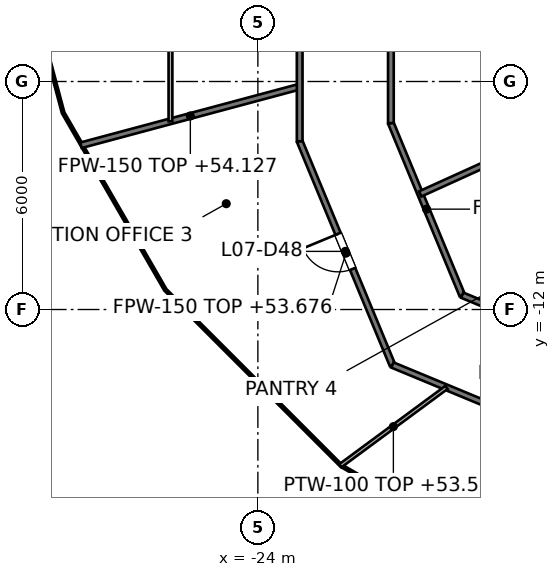
"""IFC4 building model, lengths in metres.
Left out: names, types, materials, properties, quantities, classifications, styles, units other than length and angle.
Written with IfcOpenShell. Run it as: python <this file> out.ifc"""

import sys

from ifc_helpers import new_model, si_unit, direction, frame, frame_2d, origin, place, context, subcontext, project, spatial, rectangle, extrude, element, fill, save


model = new_model("IFC4")
c1 = context("Model", 3, precision=1e-05, world=origin(), true_north=direction((0.0, 1.0)))
c2 = subcontext(c1, "Body", "Model", "MODEL_VIEW")
j1 = project(units=[si_unit("LENGTHUNIT", "METRE"), si_unit("PLANEANGLEUNIT", "RADIAN")], contexts=[c1])
p1 = place(None, origin())
s1 = spatial("IfcSite", under=j1, at=p1, CompositionType="ELEMENT")
p2 = place(p1, origin())
s2 = spatial("IfcBuilding", under=s1, at=p2, CompositionType="ELEMENT")
p3 = place(p2, frame((0.0, 0.0, 50.4)))
s3 = spatial("IfcBuildingStorey", under=s2, at=p3, CompositionType="ELEMENT", Elevation=50.4)
p4 = place(p3, frame((-22.9, -7.572, 0.0), z_axis=(0.0, 0.0, 1.0), x_axis=(0.382860357704, -0.923806227788, 0.0)))
e1 = element("IfcWall", 1, at=p4, inside=s3, PredefinedType="PARTITIONING", context=c2, shape_type="SweptSolid", body=[
    extrude(rectangle(XDim=6.374, YDim=0.15, at=frame_2d((3.187, 0.0))), origin(), (0.0, 0.0, 1.0), 3.276),
])
p5 = place(p4, frame((2.637, 0.0, 0.0)))
e2 = element("IfcOpeningElement", 2, at=p5, cuts=e1, PredefinedType="OPENING", context=c2, shape_type="SweptSolid", body=[
    extrude(rectangle(XDim=1.0, YDim=2.1, at=frame_2d((0.5, 1.05))), frame((0.0, 0.075, 0.0), z_axis=(0.0, -1.0, 0.0), x_axis=(1.0, 0.0, 0.0)), (0.0, 0.0, 1.0), 0.15),
])
p6 = place(p3, frame((-20.5, -7.095, 0.0), z_axis=(0.0, 0.0, 1.0), x_axis=(0.382878184095, -0.923798839653, 0.0)))
e3 = element("IfcWall", 3, at=p6, inside=s3, PredefinedType="PARTITIONING", context=c2, shape_type="SweptSolid", body=[
    extrude(rectangle(XDim=4.902, YDim=0.15, at=frame_2d((2.451, 0.0))), origin(), (0.0, 0.0, 1.0), 3.276),
])
p7 = place(p3, frame((-20.46, -13.46, 0.0), z_axis=(0.0, 0.0, 1.0), x_axis=(0.9237825057, -0.382917591869, 0.0)))
e4 = element("IfcWall", 4, at=p7, inside=s3, PredefinedType="PARTITIONING", context=c2, shape_type="SweptSolid", body=[
    extrude(rectangle(XDim=6.415, YDim=0.15, at=frame_2d((3.208, 0.0))), origin(), (0.0, 0.0, 1.0), 3.195),
])
p8 = place(p3, frame((-18.623, -11.623, 0.0), z_axis=(0.0, 0.0, 1.0), x_axis=(0.923791670587, -0.38289548098, 0.0)))
e5 = element("IfcWall", 5, at=p8, inside=s3, PredefinedType="PARTITIONING", context=c2, shape_type="SweptSolid", body=[
    extrude(rectangle(XDim=4.931, YDim=0.15, at=frame_2d((2.465, 0.0))), origin(), (0.0, 0.0, 1.0), 3.195),
])
p9 = place(p3, frame((-28.654, -7.678, 0.0), z_axis=(0.0, 0.0, 1.0), x_axis=(0.965918597777, 0.258846020771, 0.0)))
e6 = element("IfcWall", 6, at=p9, inside=s3, PredefinedType="PARTITIONING", context=c2, shape_type="SweptSolid", body=[
    extrude(rectangle(XDim=5.957, YDim=0.15, at=frame_2d((2.979, 0.0))), origin(), (0.0, 0.0, 1.0), 3.727),
])
p10 = place(p3, frame((-19.728, -8.958, 0.0), z_axis=(0.0, 0.0, 1.0), x_axis=(0.910629511797, 0.413223779863, 0.0)))
e7 = element("IfcWall", 7, at=p10, inside=s3, PredefinedType="PARTITIONING", context=c2, shape_type="SweptSolid", body=[
    extrude(rectangle(XDim=5.368, YDim=0.15, at=frame_2d((2.684, 0.0))), origin(), (0.0, 0.0, 1.0), 4.05),
])
p11 = place(p3, frame((-20.5, -7.095, 0.0), z_axis=(0.0, 0.0, 1.0), x_axis=(0.0, 1.0, 0.0)))
e8 = element("IfcWall", 8, at=p11, inside=s3, PredefinedType="PARTITIONING", context=c2, shape_type="SweptSolid", body=[
    extrude(rectangle(XDim=14.569, YDim=0.15, at=frame_2d((7.285, 0.0))), origin(), (0.0, 0.0, 1.0), 3.127),
])
p12 = place(p11, frame((10.234, 0.0, 0.0)))
e9 = element("IfcOpeningElement", 9, at=p12, cuts=e8, PredefinedType="OPENING", context=c2, shape_type="SweptSolid", body=[
    extrude(rectangle(XDim=1.0, YDim=2.1, at=frame_2d((0.5, 1.05))), frame((0.0, 0.075, 0.0), z_axis=(0.0, -1.0, 0.0), x_axis=(1.0, 0.0, 0.0)), (0.0, 0.0, 1.0), 0.15),
])
p13 = place(p11, frame((3.0, 0.0, 0.0)))
e10 = element("IfcOpeningElement", 10, at=p13, cuts=e8, PredefinedType="OPENING", context=c2, shape_type="SweptSolid", body=[
    extrude(rectangle(XDim=1.0, YDim=2.1, at=frame_2d((0.5, 1.05))), frame((0.0, 0.075, 0.0), z_axis=(0.0, -1.0, 0.0), x_axis=(1.0, 0.0, 0.0)), (0.0, 0.0, 1.0), 0.15),
])
p14 = place(p3, frame((-22.9, -7.572, 0.0), z_axis=(0.0, 0.0, 1.0), x_axis=(0.0, 1.0, 0.0)))
e11 = element("IfcWall", 11, at=p14, inside=s3, PredefinedType="PARTITIONING", context=c2, shape_type="SweptSolid", body=[
    extrude(rectangle(XDim=15.689, YDim=0.15, at=frame_2d((7.844, 0.0))), origin(), (0.0, 0.0, 1.0), 3.127),
])
p15 = place(p14, frame((8.062, 0.0, 0.0)))
e12 = element("IfcOpeningElement", 12, at=p15, cuts=e11, PredefinedType="OPENING", context=c2, shape_type="SweptSolid", body=[
    extrude(rectangle(XDim=1.0, YDim=2.1, at=frame_2d((0.5, 1.05))), frame((0.0, 0.075, 0.0), z_axis=(0.0, -1.0, 0.0), x_axis=(1.0, 0.0, 0.0)), (0.0, 0.0, 1.0), 0.15),
])
p16 = place(p3, frame((-21.832, -16.113, 0.0), z_axis=(0.0, 0.0, 1.0), x_axis=(0.804564485305, 0.59386529532, 0.0)))
e13 = element("IfcWall", 13, at=p16, inside=s3, PredefinedType="PARTITIONING", context=c2, shape_type="SweptSolid", body=[
    extrude(rectangle(XDim=3.474, YDim=0.1, at=frame_2d((1.737, 0.0))), origin(), (0.0, 0.0, 1.0), 3.195),
])
p17 = place(p3, frame((-26.3, -7.047, 0.0), z_axis=(0.0, 0.0, 1.0), x_axis=(0.0, 1.0, 0.0)))
e14 = element("IfcWall", 14, at=p17, inside=s3, PredefinedType="PARTITIONING", context=c2, shape_type="SweptSolid", body=[
    extrude(rectangle(XDim=16.075, YDim=0.1, at=frame_2d((8.038, 0.0))), origin(), (0.0, 0.0, 1.0), 3.127),
])
p18 = place(p17, frame((7.537, 0.0, 0.0)))
e15 = element("IfcOpeningElement", 15, at=p18, cuts=e14, PredefinedType="OPENING", context=c2, shape_type="SweptSolid", body=[
    extrude(rectangle(XDim=0.9, YDim=2.1, at=frame_2d((0.45, 1.05))), frame((0.0, 0.05, 0.0), z_axis=(0.0, -1.0, 0.0), x_axis=(1.0, 0.0, 0.0)), (0.0, 0.0, 1.0), 0.1),
])
p19 = place(p5, origin())
e16 = element("IfcDoor", 16, at=p19, inside=s3, OperationType="SINGLE_SWING_LEFT", PredefinedType="DOOR", context=c2, shape_type="SweptSolid", body=[
    extrude(rectangle(XDim=1.0, YDim=2.1, at=frame_2d((0.5, 1.05))), frame((0.0, 0.025, 0.0), z_axis=(0.0, -1.0, 0.0), x_axis=(1.0, 0.0, 0.0)), (0.0, 0.0, 1.0), 0.05),
])
fill(e2, e16)
save(model, sys.argv[1])
